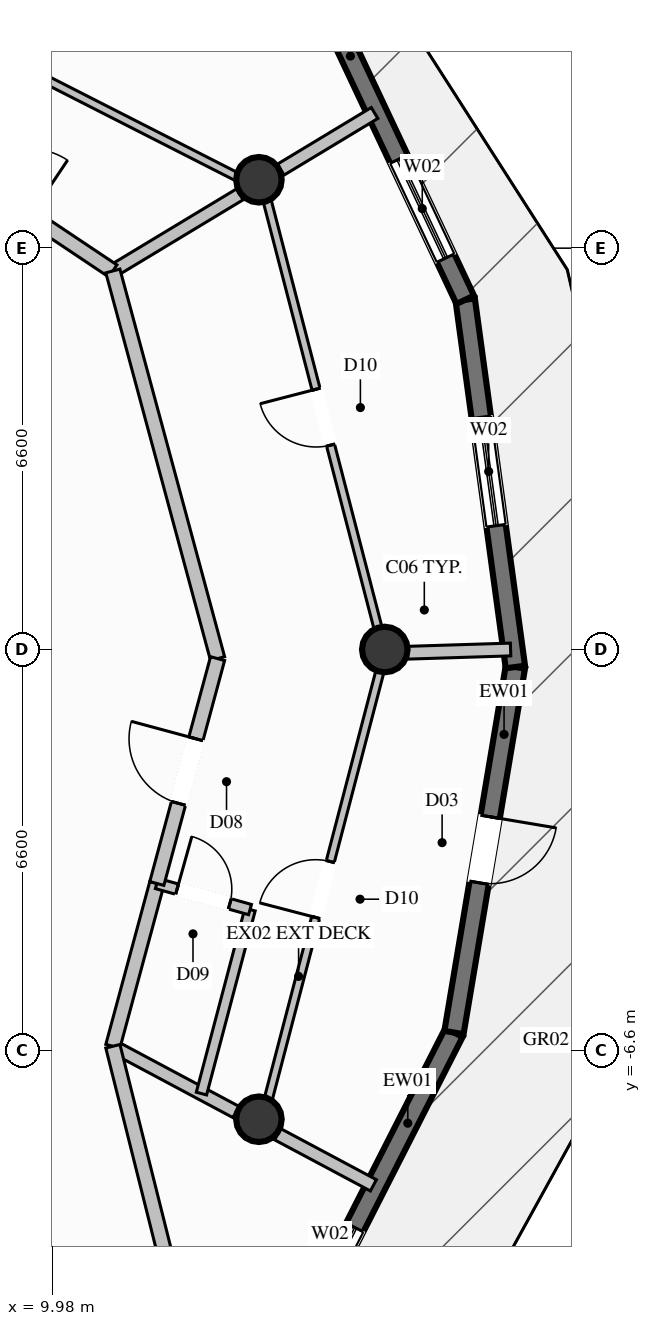
"""IFC4 building model, lengths in metres.
Left out: names, types, materials, properties, quantities, classifications, styles, units other than length and angle.
Written with IfcOpenShell. Run it as: python <this file> out.ifc"""

import sys

from ifc_helpers import new_model, si_unit, direction, frame, frame_2d, origin, origin_2d, place, context, subcontext, project, spatial, rectangle, circle, extrude, element, fill, save


model = new_model("IFC4")
c1 = context("Model", 3, precision=1e-05, world=origin(), true_north=direction((0.0, 1.0)))
c2 = subcontext(c1, "Body", "Model", "MODEL_VIEW")
j1 = project(units=[si_unit("LENGTHUNIT", "METRE"), si_unit("PLANEANGLEUNIT", "RADIAN")], contexts=[c1])
p1 = place(None, origin())
s1 = spatial("IfcSite", under=j1, at=p1, CompositionType="ELEMENT")
p2 = place(p1, origin())
s2 = spatial("IfcBuilding", under=s1, at=p2, CompositionType="ELEMENT")
p3 = place(p2, frame((0.0, 0.0, 282.0)))
s3 = spatial("IfcBuildingStorey", under=s2, at=p3, CompositionType="ELEMENT", Elevation=282.0)
for number, where, z_axis, x_axis in (
    (1, (15.45, 0.0, 0.0), (0.0, 0.0, 1.0), (1.0, 0.0, 0.0)),
    (2, (13.38, 7.725, 0.0), (0.0, 0.0, 1.0), (1.0, 0.0, 0.0)),
    (3, (13.38, -7.725, 0.0), (0.0, 0.0, 1.0), (1.0, 0.0, 0.0)),
):
    element("IfcColumn", number, at=place(p3, frame(where, z_axis=z_axis, x_axis=x_axis)), inside=s3, PredefinedType="COLUMN", context=c2, shape_type="SweptSolid", body=[
        extrude(circle(Radius=0.375, at=origin_2d()), origin(), (0.0, 0.0, 1.0), 3.8),
    ])
p4 = place(p3, frame((16.588, -6.299, 0.0), z_axis=(0.0, 0.0, 1.0), x_axis=(-0.453783790234, -0.891111817743, 0.0)))
e4 = element("IfcWall", 4, at=p4, inside=s3, PredefinedType="SOLIDWALL", context=c2, shape_type="SweptSolid", body=[
    extrude(rectangle(XDim=6.053, YDim=0.32, at=frame_2d((3.027, 0.0))), origin(), (0.0, 0.0, 1.0), 3.57),
])
p5 = place(p4, frame((3.597, 0.0, 0.35)))
e5 = element("IfcOpeningElement", 5, at=p5, cuts=e4, PredefinedType="OPENING", context=c2, shape_type="SweptSolid", body=[
    extrude(rectangle(XDim=1.8, YDim=2.6, at=frame_2d((0.9, 1.3))), frame((0.0, 0.17, 0.0), z_axis=(0.0, -1.0, 0.0), x_axis=(1.0, 0.0, 0.0)), (0.0, 0.0, 1.0), 0.34),
])
p6 = place(p3, frame((17.598, -0.288, 0.0), z_axis=(0.0, 0.0, 1.0), x_axis=(-0.165704395055, -0.986175467886, 0.0)))
e6 = element("IfcWall", 6, at=p6, inside=s3, PredefinedType="SOLIDWALL", context=c2, shape_type="SweptSolid", body=[
    extrude(rectangle(XDim=6.095, YDim=0.32, at=frame_2d((3.048, 0.0))), origin(), (0.0, 0.0, 1.0), 3.57),
])
p7 = place(p6, frame((2.498, 0.0, 0.0)))
e7 = element("IfcOpeningElement", 7, at=p7, cuts=e6, PredefinedType="OPENING", context=c2, shape_type="SweptSolid", body=[
    extrude(rectangle(XDim=1.1, YDim=2.2, at=frame_2d((0.55, 1.1))), frame((0.0, 0.17, 0.0), z_axis=(0.0, -1.0, 0.0), x_axis=(1.0, 0.0, 0.0)), (0.0, 0.0, 1.0), 0.34),
])
p8 = place(p3, frame((16.773, 5.751, 0.0), z_axis=(0.0, 0.0, 1.0), x_axis=(0.135345568291, -0.990798454351, 0.0)))
e8 = element("IfcWall", 8, at=p8, inside=s3, PredefinedType="SOLIDWALL", context=c2, shape_type="SweptSolid", body=[
    extrude(rectangle(XDim=6.095, YDim=0.32, at=frame_2d((3.048, 0.0))), origin(), (0.0, 0.0, 1.0), 3.57),
])
p9 = place(p8, frame((1.95, 0.0, 0.35)))
e9 = element("IfcOpeningElement", 9, at=p9, cuts=e8, PredefinedType="OPENING", context=c2, shape_type="SweptSolid", body=[
    extrude(rectangle(XDim=1.8, YDim=2.6, at=frame_2d((0.9, 1.3))), frame((0.0, 0.17, 0.0), z_axis=(0.0, -1.0, 0.0), x_axis=(1.0, 0.0, 0.0)), (0.0, 0.0, 1.0), 0.34),
])
p10 = place(p3, frame((14.193, 11.227, 0.0), z_axis=(0.0, 0.0, 1.0), x_axis=(0.426183517714, -0.904636727769, 0.0)))
e10 = element("IfcWall", 10, at=p10, inside=s3, PredefinedType="SOLIDWALL", context=c2, shape_type="SweptSolid", body=[
    extrude(rectangle(XDim=6.053, YDim=0.32, at=frame_2d((3.027, 0.0))), origin(), (0.0, 0.0, 1.0), 3.57),
])
p11 = place(p10, frame((3.496, 0.0, 0.35)))
e11 = element("IfcOpeningElement", 11, at=p11, cuts=e10, PredefinedType="OPENING", context=c2, shape_type="SweptSolid", body=[
    extrude(rectangle(XDim=1.8, YDim=2.6, at=frame_2d((0.9, 1.3))), frame((0.0, 0.17, 0.0), z_axis=(0.0, -1.0, 0.0), x_axis=(1.0, 0.0, 0.0)), (0.0, 0.0, 1.0), 0.34),
])
p12 = place(p3, frame((10.978, 6.225, 0.0), z_axis=(0.0, 0.0, 1.0), x_axis=(0.856173916647, 0.516687743664, 0.0)))
e12 = element("IfcWall", 12, at=p12, inside=s3, PredefinedType="PARTITIONING", context=c2, shape_type="SweptSolid", body=[
    extrude(rectangle(XDim=2.439, YDim=0.21, at=frame_2d((1.219, 0.0))), origin(), (0.0, 0.0, 1.0), 3.085),
])
p13 = place(p3, frame((13.738, 7.891, 0.0), z_axis=(0.0, 0.0, 1.0), x_axis=(0.856140161033, 0.516743674045, 0.0)))
e13 = element("IfcWall", 13, at=p13, inside=s3, PredefinedType="PARTITIONING", context=c2, shape_type="SweptSolid", body=[
    extrude(rectangle(XDim=1.803, YDim=0.21, at=frame_2d((0.902, 0.0))), origin(), (0.0, 0.0, 1.0), 3.57),
])
p14 = place(p3, frame((10.978, -6.525, 0.0), z_axis=(0.0, 0.0, 1.0), x_axis=(0.882152653626, -0.470963582138, 0.0)))
e14 = element("IfcWall", 14, at=p14, inside=s3, PredefinedType="PARTITIONING", context=c2, shape_type="SweptSolid", body=[
    extrude(rectangle(XDim=2.295, YDim=0.21, at=frame_2d((1.148, 0.0))), origin(), (0.0, 0.0, 1.0), 3.085),
])
p15 = place(p3, frame((13.689, -7.972, 0.0), z_axis=(0.0, 0.0, 1.0), x_axis=(0.882205167705, -0.470865205844, 0.0)))
e15 = element("IfcWall", 15, at=p15, inside=s3, PredefinedType="PARTITIONING", context=c2, shape_type="SweptSolid", body=[
    extrude(rectangle(XDim=1.784, YDim=0.21, at=frame_2d((0.892, 0.0))), origin(), (0.0, 0.0, 1.0), 3.57),
])
p16 = place(p3, frame((7.35, 8.65, 0.0), z_axis=(0.0, 0.0, 1.0), x_axis=(0.831395547998, -0.555681062094, 0.0)))
e16 = element("IfcWall", 16, at=p16, inside=s3, PredefinedType="PARTITIONING", context=c2, shape_type="SweptSolid", body=[
    extrude(rectangle(XDim=4.364, YDim=0.24, at=frame_2d((2.182, 0.0))), origin(), (0.0, 0.0, 1.0), 3.57),
])
p17 = place(p16, frame((1.632, 0.0, 0.0)))
e17 = element("IfcOpeningElement", 17, at=p17, cuts=e16, PredefinedType="OPENING", context=c2, shape_type="SweptSolid", body=[
    extrude(rectangle(XDim=1.1, YDim=2.3, at=frame_2d((0.55, 1.15))), frame((0.0, 0.13, 0.0), z_axis=(0.0, -1.0, 0.0), x_axis=(1.0, 0.0, 0.0)), (0.0, 0.0, 1.0), 0.26),
])
p18 = place(p3, frame((0.0, 14.403, 0.0), z_axis=(0.0, 0.0, 1.0), x_axis=(0.89107593803, -0.45385424165, 0.0)))
e18 = element("IfcWall", 18, at=p18, inside=s3, PredefinedType="PARTITIONING", context=c2, shape_type="SweptSolid", body=[
    extrude(rectangle(XDim=14.928, YDim=0.135, at=frame_2d((7.464, 0.0))), origin(), (0.0, 0.0, 1.0), 3.085),
])
p19 = place(p18, frame((6.989, 0.0, 0.0)))
e19 = element("IfcOpeningElement", 19, at=p19, cuts=e18, PredefinedType="OPENING", context=c2, shape_type="SweptSolid", body=[
    extrude(rectangle(XDim=0.95, YDim=2.1, at=frame_2d((0.475, 1.05))), frame((0.0, 0.078, 0.0), z_axis=(0.0, -1.0, 0.0), x_axis=(1.0, 0.0, 0.0)), (0.0, 0.0, 1.0), 0.155),
])
p20 = place(p3, frame((10.978, -6.525, 0.0), z_axis=(0.0, 0.0, 1.0), x_axis=(0.260702780503, 0.965419111183, 0.0)))
e20 = element("IfcWall", 20, at=p20, inside=s3, PredefinedType="PARTITIONING", context=c2, shape_type="SweptSolid", body=[
    extrude(rectangle(XDim=2.773, YDim=0.24, at=frame_2d((1.386, 0.0))), origin(), (0.0, 0.0, 1.0), 3.57),
])
p21 = place(p3, frame((12.435, -7.303, 0.0), z_axis=(0.0, 0.0, 1.0), x_axis=(0.255253529306, 0.966874157156, 0.0)))
e21 = element("IfcWall", 21, at=p21, inside=s3, PredefinedType="PLUMBINGWALL", context=c2, shape_type="SweptSolid", body=[
    extrude(rectangle(XDim=3.13, YDim=0.175, at=frame_2d((1.565, 0.0))), origin(), (0.0, 0.0, 1.0), 3.57),
])
p22 = place(p3, frame((11.701, -3.848, 0.0), z_axis=(0.0, 0.0, 1.0), x_axis=(0.962968797948, -0.269612859817, 0.0)))
e22 = element("IfcWall", 22, at=p22, inside=s3, PredefinedType="PLUMBINGWALL", context=c2, shape_type="SweptSolid", body=[
    extrude(rectangle(XDim=1.592, YDim=0.175, at=frame_2d((0.796, 0.0))), origin(), (0.0, 0.0, 1.0), 3.57),
])
p23 = place(p22, frame((0.346, 0.0, 0.0)))
e23 = element("IfcOpeningElement", 23, at=p23, cuts=e22, PredefinedType="OPENING", context=c2, shape_type="SweptSolid", body=[
    extrude(rectangle(XDim=0.9, YDim=2.1, at=frame_2d((0.45, 1.05))), frame((0.0, 0.098, 0.0), z_axis=(0.0, -1.0, 0.0), x_axis=(1.0, 0.0, 0.0)), (0.0, 0.0, 1.0), 0.195),
])
p24 = place(p3, frame((15.447, -0.065, 0.0), z_axis=(0.0, 0.0, 1.0), x_axis=(0.999509199435, 0.031326669854, 0.0)))
e24 = element("IfcWall", 24, at=p24, inside=s3, PredefinedType="PARTITIONING", context=c2, shape_type="SweptSolid", body=[
    extrude(rectangle(XDim=2.073, YDim=0.21, at=frame_2d((1.037, 0.0))), origin(), (0.0, 0.0, 1.0), 3.57),
])
p25 = place(p3, frame((12.7, -0.15, 0.0), z_axis=(0.0, 0.0, 1.0), x_axis=(-0.260760959349, 0.965403398626, 0.0)))
e25 = element("IfcWall", 25, at=p25, inside=s3, PredefinedType="PARTITIONING", context=c2, shape_type="SweptSolid", body=[
    extrude(rectangle(XDim=6.604, YDim=0.24, at=frame_2d((3.302, 0.0))), origin(), (0.0, 0.0, 1.0), 3.57),
])
p26 = place(p3, frame((11.701, -3.848, 0.0), z_axis=(0.0, 0.0, 1.0), x_axis=(0.260803073576, 0.965392022348, 0.0)))
e26 = element("IfcWall", 26, at=p26, inside=s3, PredefinedType="PARTITIONING", context=c2, shape_type="SweptSolid", body=[
    extrude(rectangle(XDim=3.831, YDim=0.24, at=frame_2d((1.915, 0.0))), origin(), (0.0, 0.0, 1.0), 3.57),
])
p27 = place(p26, frame((1.365, 0.0, 0.0)))
e27 = element("IfcOpeningElement", 27, at=p27, cuts=e26, PredefinedType="OPENING", context=c2, shape_type="SweptSolid", body=[
    extrude(rectangle(XDim=1.1, YDim=2.3, at=frame_2d((0.55, 1.15))), frame((0.0, 0.13, 0.0), z_axis=(0.0, -1.0, 0.0), x_axis=(1.0, 0.0, 0.0)), (0.0, 0.0, 1.0), 0.26),
])
p28 = place(p3, frame((13.42, -7.829, 0.0), z_axis=(0.0, 0.0, 1.0), x_axis=(0.252616340929, 0.967566527065, 0.0)))
e28 = element("IfcWall", 28, at=p28, inside=s3, PredefinedType="PARTITIONING", context=c2, shape_type="SweptSolid", body=[
    extrude(rectangle(XDim=8.024, YDim=0.135, at=frame_2d((4.012, 0.0))), origin(), (0.0, 0.0, 1.0), 3.137),
])
p29 = place(p28, frame((3.537, 0.0, 0.0)))
e29 = element("IfcOpeningElement", 29, at=p29, cuts=e28, PredefinedType="OPENING", context=c2, shape_type="SweptSolid", body=[
    extrude(rectangle(XDim=0.95, YDim=2.1, at=frame_2d((0.475, 1.05))), frame((0.0, 0.078, 0.0), z_axis=(0.0, -1.0, 0.0), x_axis=(1.0, 0.0, 0.0)), (0.0, 0.0, 1.0), 0.155),
])
p30 = place(p3, frame((15.447, -0.065, 0.0), z_axis=(0.0, 0.0, 1.0), x_axis=(-0.251126791961, 0.967954200548, 0.0)))
e30 = element("IfcWall", 30, at=p30, inside=s3, PredefinedType="PARTITIONING", context=c2, shape_type="SweptSolid", body=[
    extrude(rectangle(XDim=8.028, YDim=0.135, at=frame_2d((4.014, 0.0))), origin(), (0.0, 0.0, 1.0), 3.137),
])
p31 = place(p30, frame((3.539, 0.0, 0.0)))
e31 = element("IfcOpeningElement", 31, at=p31, cuts=e30, PredefinedType="OPENING", context=c2, shape_type="SweptSolid", body=[
    extrude(rectangle(XDim=0.95, YDim=2.1, at=frame_2d((0.475, 1.05))), frame((0.0, 0.078, 0.0), z_axis=(0.0, -1.0, 0.0), x_axis=(1.0, 0.0, 0.0)), (0.0, 0.0, 1.0), 0.155),
])
p32 = place(p3, frame((12.3, -11.8, 0.0), z_axis=(0.0, 0.0, 1.0), x_axis=(-0.243095426382, 0.970002378179, 0.0)))
e32 = element("IfcWall", 32, at=p32, inside=s3, PredefinedType="PARTITIONING", context=c2, shape_type="SweptSolid", body=[
    extrude(rectangle(XDim=5.438, YDim=0.24, at=frame_2d((2.719, 0.0))), origin(), (0.0, 0.0, 1.0), 3.57),
])
p33 = place(p5, origin())
e33 = element("IfcWindow", 33, at=p33, inside=s3, PartitioningType="SINGLE_PANEL", PredefinedType="WINDOW", context=c2, shape_type="SweptSolid", body=[
    extrude(rectangle(XDim=1.8, YDim=2.6, at=frame_2d((0.9, 1.3))), frame((0.0, 0.03, 0.0), z_axis=(0.0, -1.0, 0.0), x_axis=(1.0, 0.0, 0.0)), (0.0, 0.0, 1.0), 0.06),
])
fill(e5, e33)
p34 = place(p7, origin())
e34 = element("IfcDoor", 34, at=p34, inside=s3, OperationType="SINGLE_SWING_LEFT", PredefinedType="DOOR", context=c2, shape_type="SweptSolid", body=[
    extrude(rectangle(XDim=1.1, YDim=2.2, at=frame_2d((0.55, 1.1))), frame((0.0, 0.025, 0.0), z_axis=(0.0, -1.0, 0.0), x_axis=(1.0, 0.0, 0.0)), (0.0, 0.0, 1.0), 0.05),
])
fill(e7, e34)
p35 = place(p9, origin())
e35 = element("IfcWindow", 35, at=p35, inside=s3, PartitioningType="SINGLE_PANEL", PredefinedType="WINDOW", context=c2, shape_type="SweptSolid", body=[
    extrude(rectangle(XDim=1.8, YDim=2.6, at=frame_2d((0.9, 1.3))), frame((0.0, 0.03, 0.0), z_axis=(0.0, -1.0, 0.0), x_axis=(1.0, 0.0, 0.0)), (0.0, 0.0, 1.0), 0.06),
])
fill(e9, e35)
p36 = place(p11, origin())
e36 = element("IfcWindow", 36, at=p36, inside=s3, PartitioningType="SINGLE_PANEL", PredefinedType="WINDOW", context=c2, shape_type="SweptSolid", body=[
    extrude(rectangle(XDim=1.8, YDim=2.6, at=frame_2d((0.9, 1.3))), frame((0.0, 0.03, 0.0), z_axis=(0.0, -1.0, 0.0), x_axis=(1.0, 0.0, 0.0)), (0.0, 0.0, 1.0), 0.06),
])
fill(e11, e36)
p37 = place(p23, origin())
e37 = element("IfcDoor", 37, at=p37, inside=s3, OperationType="SINGLE_SWING_LEFT", PredefinedType="DOOR", context=c2, shape_type="SweptSolid", body=[
    extrude(rectangle(XDim=0.9, YDim=2.1, at=frame_2d((0.45, 1.05))), frame((0.0, 0.025, 0.0), z_axis=(0.0, -1.0, 0.0), x_axis=(1.0, 0.0, 0.0)), (0.0, 0.0, 1.0), 0.05),
])
fill(e23, e37)
p38 = place(p27, origin())
e38 = element("IfcDoor", 38, at=p38, inside=s3, OperationType="SINGLE_SWING_RIGHT", PredefinedType="DOOR", context=c2, shape_type="SweptSolid", body=[
    extrude(rectangle(XDim=1.1, YDim=2.3, at=frame_2d((0.55, 1.15))), frame((0.0, 0.025, 0.0), z_axis=(0.0, -1.0, 0.0), x_axis=(1.0, 0.0, 0.0)), (0.0, 0.0, 1.0), 0.05),
])
fill(e27, e38)
p39 = place(p29, origin())
e39 = element("IfcDoor", 39, at=p39, inside=s3, OperationType="SINGLE_SWING_LEFT", PredefinedType="DOOR", context=c2, shape_type="SweptSolid", body=[
    extrude(rectangle(XDim=0.95, YDim=2.1, at=frame_2d((0.475, 1.05))), frame((0.0, 0.025, 0.0), z_axis=(0.0, -1.0, 0.0), x_axis=(1.0, 0.0, 0.0)), (0.0, 0.0, 1.0), 0.05),
])
fill(e29, e39)
p40 = place(p31, origin())
e40 = element("IfcDoor", 40, at=p40, inside=s3, OperationType="SINGLE_SWING_RIGHT", PredefinedType="DOOR", context=c2, shape_type="SweptSolid", body=[
    extrude(rectangle(XDim=0.95, YDim=2.1, at=frame_2d((0.475, 1.05))), frame((0.0, 0.025, 0.0), z_axis=(0.0, -1.0, 0.0), x_axis=(1.0, 0.0, 0.0)), (0.0, 0.0, 1.0), 0.05),
])
fill(e31, e40)
save(model, sys.argv[1])
